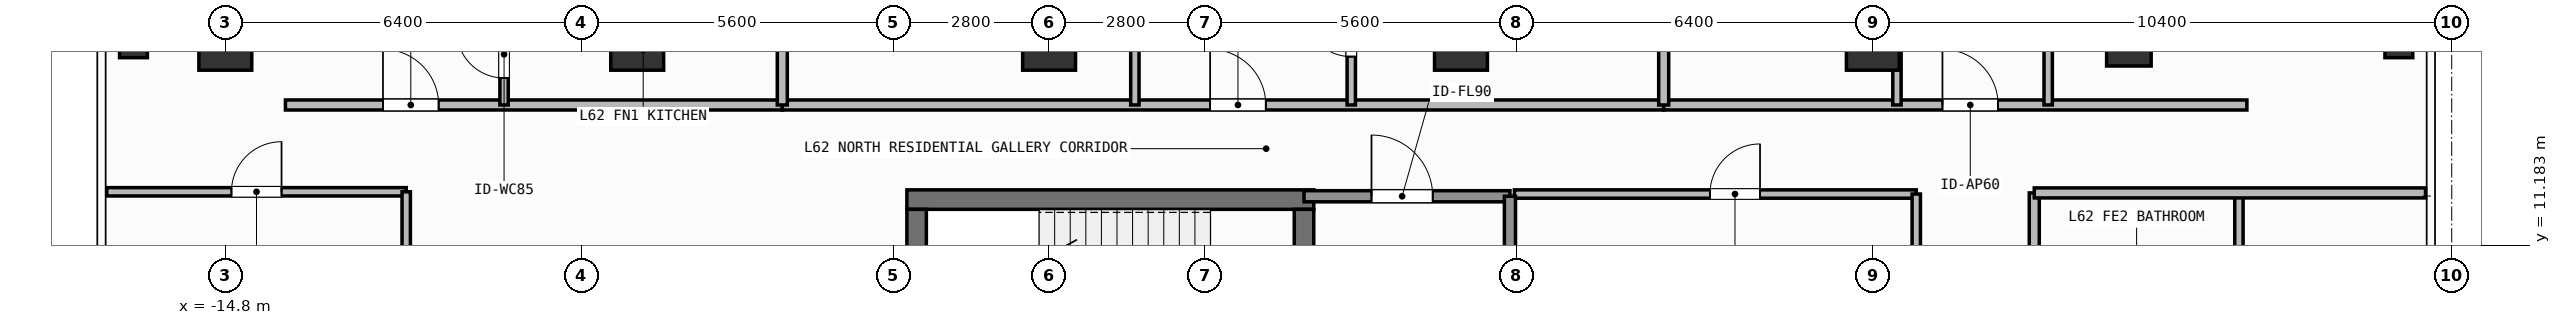
"""IFC4 building model, lengths in metres.
Left out: names, types, materials, properties, quantities, classifications, styles, units other than length and angle.
Written with IfcOpenShell. Run it as: python <this file> out.ifc"""

import sys

from ifc_helpers import new_model, si_unit, direction, frame, frame_2d, origin, origin_2d, place, context, subcontext, project, spatial, rectangle, hollow_rectangle, extrude, element, fill, save


model = new_model("IFC4")
c1 = context("Model", 3, precision=1e-05, world=origin(), true_north=direction((0.0, 1.0)))
c2 = subcontext(c1, "Body", "Model", "MODEL_VIEW")
j1 = project(units=[si_unit("LENGTHUNIT", "METRE"), si_unit("PLANEANGLEUNIT", "RADIAN")], contexts=[c1])
p1 = place(None, origin())
s1 = spatial("IfcSite", under=j1, at=p1, CompositionType="ELEMENT")
p2 = place(p1, origin())
s2 = spatial("IfcBuilding", under=s1, at=p2, CompositionType="ELEMENT")
p3 = place(p2, frame((0.0, 0.0, 254.7)))
s3 = spatial("IfcBuildingStorey", under=s2, at=p3, CompositionType="ELEMENT", Elevation=254.7)
p4 = place(p3, frame((-2.555, 12.0, 0.0), z_axis=(0.0, 0.0, 1.0), x_axis=(1.0, 0.0, 0.0)))
e1 = element("IfcWall", 1, at=p4, inside=s3, PredefinedType="SHEAR", context=c2, shape_type="SweptSolid", body=[
    extrude(rectangle(XDim=7.31, YDim=0.35, at=frame_2d((3.655, 0.0))), origin(), (0.0, 0.0, 1.0), 3.9),
])
p5 = place(p3, frame((-2.38, 8.9, 0.0), z_axis=(0.0, 0.0, 1.0), x_axis=(0.0, 1.0, 0.0)))
e2 = element("IfcWall", 2, at=p5, inside=s3, PredefinedType="SHEAR", context=c2, shape_type="SweptSolid", body=[
    extrude(rectangle(XDim=2.925, YDim=0.35, at=frame_2d((1.462, 0.0))), origin(), (0.0, 0.0, 1.0), 3.9),
])
p6 = place(p3, frame((4.58, 11.825, 0.0), z_axis=(0.0, 0.0, 1.0), x_axis=(0.0, -1.0, 0.0)))
e3 = element("IfcWall", 3, at=p6, inside=s3, PredefinedType="SHEAR", context=c2, shape_type="SweptSolid", body=[
    extrude(rectangle(XDim=2.925, YDim=0.35, at=frame_2d((1.462, 0.0))), origin(), (0.0, 0.0, 1.0), 3.9),
])
p7 = place(p6, frame((0.913, 0.0, 0.0)))
e4 = element("IfcOpeningElement", 4, at=p7, cuts=e3, PredefinedType="OPENING", context=c2, shape_type="SweptSolid", body=[
    extrude(rectangle(XDim=1.1, YDim=2.15, at=frame_2d((0.55, 1.075))), frame((0.0, 0.185, 0.0), z_axis=(0.0, -1.0, 0.0), x_axis=(1.0, 0.0, 0.0)), (0.0, 0.0, 1.0), 0.37),
])
for number, where, z_axis, x_axis in (
    (5, (-14.8, 14.8, 0.0), (0.0, 0.0, 1.0), (1.0, 0.0, 0.0)),
    (6, (-7.4, 14.8, 0.0), (0.0, 0.0, 1.0), (1.0, 0.0, 0.0)),
    (7, (0.0, 14.8, 0.0), (0.0, 0.0, 1.0), (1.0, 0.0, 0.0)),
    (8, (7.4, 14.8, 0.0), (0.0, 0.0, 1.0), (1.0, 0.0, 0.0)),
    (9, (14.8, 14.8, 0.0), (0.0, 0.0, 1.0), (1.0, 0.0, 0.0)),
):
    element("IfcColumn", number, at=place(p3, frame(where, z_axis=z_axis, x_axis=x_axis)), inside=s3, PredefinedType="COLUMN", context=c2, shape_type="SweptSolid", body=[
        extrude(rectangle(XDim=0.95, YDim=0.95, at=origin_2d()), origin(), (0.0, 0.0, 1.0), 3.9),
    ])
p8 = place(p3, frame((19.4, 14.8, 0.0), z_axis=(0.0, 0.0, 1.0), x_axis=(1.0, 0.0, 0.0)))
e10 = element("IfcColumn", 10, at=p8, inside=s3, PredefinedType="COLUMN", context=c2, shape_type="SweptSolid", body=[
    extrude(hollow_rectangle(XDim=0.8, YDim=0.8, WallThickness=0.036, at=origin_2d()), origin(), (0.0, 0.0, 1.0), 3.9),
])
for number, where, z_axis, x_axis in (
    (11, (-16.45, 14.8, 0.0), (0.0, 0.0, 1.0), (1.0, 0.0, 0.0)),
    (12, (24.25, 14.8, 0.0), (0.0, 0.0, 1.0), (1.0, 0.0, 0.0)),
):
    element("IfcColumn", number, at=place(p3, frame(where, z_axis=z_axis, x_axis=x_axis)), inside=s3, PredefinedType="COLUMN", context=c2, shape_type="SweptSolid", body=[
        extrude(hollow_rectangle(XDim=0.5, YDim=0.5, WallThickness=0.025, at=origin_2d()), origin(), (0.0, 0.0, 1.0), 3.9),
    ])
p9 = place(p3, frame((4.58, 12.06, 0.0), z_axis=(0.0, 0.0, 1.0), x_axis=(1.0, 0.0, 0.0)))
e13 = element("IfcWall", 13, at=p9, inside=s3, PredefinedType="SOLIDWALL", context=c2, shape_type="SweptSolid", body=[
    extrude(rectangle(XDim=3.7, YDim=0.2, at=frame_2d((1.85, 0.0))), origin(), (0.0, 0.0, 1.0), 3.68),
])
p10 = place(p9, frame((1.212, 0.0, 0.0)))
e14 = element("IfcOpeningElement", 14, at=p10, cuts=e13, PredefinedType="OPENING", context=c2, shape_type="SweptSolid", body=[
    extrude(rectangle(XDim=1.1, YDim=2.15, at=frame_2d((0.55, 1.075))), frame((0.0, 0.11, 0.0), z_axis=(0.0, -1.0, 0.0), x_axis=(1.0, 0.0, 0.0)), (0.0, 0.0, 1.0), 0.22),
])
p11 = place(p3, frame((8.36, 12.1, 0.0), z_axis=(0.0, 0.0, 1.0), x_axis=(1.0, 0.0, 0.0)))
e15 = element("IfcWall", 15, at=p11, inside=s3, PredefinedType="PARTITIONING", context=c2, shape_type="SweptSolid", body=[
    extrude(rectangle(XDim=7.22, YDim=0.15, at=frame_2d((3.61, 0.0))), origin(), (0.0, 0.0, 1.0), 3.68),
])
p12 = place(p11, frame((3.513, 0.0, 0.0)))
e16 = element("IfcOpeningElement", 16, at=p12, cuts=e15, PredefinedType="OPENING", context=c2, shape_type="SweptSolid", body=[
    extrude(rectangle(XDim=0.9, YDim=2.1, at=frame_2d((0.45, 1.05))), frame((0.0, 0.085, 0.0), z_axis=(0.0, -1.0, 0.0), x_axis=(1.0, 0.0, 0.0)), (0.0, 0.0, 1.0), 0.17),
])
p13 = place(p3, frame((-13.72, 13.7, 0.0), z_axis=(0.0, 0.0, 1.0), x_axis=(1.0, 0.0, 0.0)))
e17 = element("IfcWall", 17, at=p13, inside=s3, PredefinedType="PARTITIONING", context=c2, shape_type="SweptSolid", body=[
    extrude(rectangle(XDim=8.927, YDim=0.18, at=frame_2d((4.463, 0.0))), origin(), (0.0, 0.0, 1.0), 3.68),
])
p14 = place(p13, frame((1.752, 0.0, 0.0)))
e18 = element("IfcOpeningElement", 18, at=p14, cuts=e17, PredefinedType="OPENING", context=c2, shape_type="SweptSolid", body=[
    extrude(rectangle(XDim=1.0, YDim=2.2, at=frame_2d((0.5, 1.1))), frame((0.0, 0.1, 0.0), z_axis=(0.0, -1.0, 0.0), x_axis=(1.0, 0.0, 0.0)), (0.0, 0.0, 1.0), 0.2),
])
p15 = place(p3, frame((-9.792, 13.7, 0.0), z_axis=(0.0, 0.0, 1.0), x_axis=(0.0, 1.0, 0.0)))
e19 = element("IfcWall", 19, at=p15, inside=s3, PredefinedType="PARTITIONING", context=c2, shape_type="SweptSolid", body=[
    extrude(rectangle(XDim=1.982, YDim=0.15, at=frame_2d((0.991, 0.0))), origin(), (0.0, 0.0, 1.0), 3.68),
])
p16 = place(p15, frame((0.485, 0.0, 0.0)))
e20 = element("IfcOpeningElement", 20, at=p16, cuts=e19, PredefinedType="OPENING", context=c2, shape_type="SweptSolid", body=[
    extrude(rectangle(XDim=0.85, YDim=2.1, at=frame_2d((0.425, 1.05))), frame((0.0, 0.085, 0.0), z_axis=(0.0, -1.0, 0.0), x_axis=(1.0, 0.0, 0.0)), (0.0, 0.0, 1.0), 0.17),
])
p17 = place(p3, frame((-4.793, 13.7, 0.0), z_axis=(0.0, 0.0, 1.0), x_axis=(1.0, 0.0, 0.0)))
e21 = element("IfcWall", 21, at=p17, inside=s3, PredefinedType="PARTITIONING", context=c2, shape_type="SweptSolid", body=[
    extrude(rectangle(XDim=15.835, YDim=0.18, at=frame_2d((7.917, 0.0))), origin(), (0.0, 0.0, 1.0), 3.68),
])
p18 = place(p17, frame((7.686, 0.0, 0.0)))
e22 = element("IfcOpeningElement", 22, at=p18, cuts=e21, PredefinedType="OPENING", context=c2, shape_type="SweptSolid", body=[
    extrude(rectangle(XDim=1.0, YDim=2.2, at=frame_2d((0.5, 1.1))), frame((0.0, 0.1, 0.0), z_axis=(0.0, -1.0, 0.0), x_axis=(1.0, 0.0, 0.0)), (0.0, 0.0, 1.0), 0.2),
])
p19 = place(p3, frame((1.541, 13.7, 0.0), z_axis=(0.0, 0.0, 1.0), x_axis=(0.0, 1.0, 0.0)))
e23 = element("IfcWall", 23, at=p19, inside=s3, PredefinedType="PARTITIONING", context=c2, shape_type="SweptSolid", body=[
    extrude(rectangle(XDim=4.147, YDim=0.15, at=frame_2d((2.073, 0.0))), origin(), (0.0, 0.0, 1.0), 3.68),
])
p20 = place(p19, frame((1.736, 0.0, 0.0)))
e24 = element("IfcOpeningElement", 24, at=p20, cuts=e23, PredefinedType="OPENING", context=c2, shape_type="SweptSolid", body=[
    extrude(rectangle(XDim=0.85, YDim=2.1, at=frame_2d((0.425, 1.05))), frame((0.0, 0.085, 0.0), z_axis=(0.0, -1.0, 0.0), x_axis=(1.0, 0.0, 0.0)), (0.0, 0.0, 1.0), 0.17),
])
p21 = place(p3, frame((5.429, 13.7, 0.0), z_axis=(0.0, 0.0, 1.0), x_axis=(0.0, 1.0, 0.0)))
e25 = element("IfcWall", 25, at=p21, inside=s3, PredefinedType="PARTITIONING", context=c2, shape_type="SweptSolid", body=[
    extrude(rectangle(XDim=2.588, YDim=0.15, at=frame_2d((1.294, 0.0))), origin(), (0.0, 0.0, 1.0), 3.68),
])
p22 = place(p21, frame((0.869, 0.0, 0.0)))
e26 = element("IfcOpeningElement", 26, at=p22, cuts=e25, PredefinedType="OPENING", context=c2, shape_type="SweptSolid", body=[
    extrude(rectangle(XDim=0.85, YDim=2.1, at=frame_2d((0.425, 1.05))), frame((0.0, 0.085, 0.0), z_axis=(0.0, -1.0, 0.0), x_axis=(1.0, 0.0, 0.0)), (0.0, 0.0, 1.0), 0.17),
])
p23 = place(p3, frame((11.042, 13.7, 0.0), z_axis=(0.0, 0.0, 1.0), x_axis=(1.0, 0.0, 0.0)))
e27 = element("IfcWall", 27, at=p23, inside=s3, PredefinedType="PARTITIONING", context=c2, shape_type="SweptSolid", body=[
    extrude(rectangle(XDim=10.478, YDim=0.18, at=frame_2d((5.239, 0.0))), origin(), (0.0, 0.0, 1.0), 3.68),
])
p24 = place(p23, frame((5.008, 0.0, 0.0)))
e28 = element("IfcOpeningElement", 28, at=p24, cuts=e27, PredefinedType="OPENING", context=c2, shape_type="SweptSolid", body=[
    extrude(rectangle(XDim=1.0, YDim=2.2, at=frame_2d((0.5, 1.1))), frame((0.0, 0.1, 0.0), z_axis=(0.0, -1.0, 0.0), x_axis=(1.0, 0.0, 0.0)), (0.0, 0.0, 1.0), 0.2),
])
p25 = place(p3, frame((15.233, 13.7, 0.0), z_axis=(0.0, 0.0, 1.0), x_axis=(0.0, 1.0, 0.0)))
e29 = element("IfcWall", 29, at=p25, inside=s3, PredefinedType="PARTITIONING", context=c2, shape_type="SweptSolid", body=[
    extrude(rectangle(XDim=4.25, YDim=0.15, at=frame_2d((2.125, 0.0))), origin(), (0.0, 0.0, 1.0), 3.68),
])
p26 = place(p25, frame((1.7, 0.0, 0.0)))
e30 = element("IfcOpeningElement", 30, at=p26, cuts=e29, PredefinedType="OPENING", context=c2, shape_type="SweptSolid", body=[
    extrude(rectangle(XDim=0.85, YDim=2.1, at=frame_2d((0.425, 1.05))), frame((0.0, 0.085, 0.0), z_axis=(0.0, -1.0, 0.0), x_axis=(1.0, 0.0, 0.0)), (0.0, 0.0, 1.0), 0.17),
])
p27 = place(p3, frame((17.95, 13.7, 0.0), z_axis=(0.0, 0.0, 1.0), x_axis=(0.0, 1.0, 0.0)))
e31 = element("IfcWall", 31, at=p27, inside=s3, PredefinedType="PARTITIONING", context=c2, shape_type="SweptSolid", body=[
    extrude(rectangle(XDim=4.25, YDim=0.15, at=frame_2d((2.125, 0.0))), origin(), (0.0, 0.0, 1.0), 3.68),
])
p28 = place(p27, frame((1.7, 0.0, 0.0)))
e32 = element("IfcOpeningElement", 32, at=p28, cuts=e31, PredefinedType="OPENING", context=c2, shape_type="SweptSolid", body=[
    extrude(rectangle(XDim=0.85, YDim=2.1, at=frame_2d((0.425, 1.05))), frame((0.0, 0.085, 0.0), z_axis=(0.0, -1.0, 0.0), x_axis=(1.0, 0.0, 0.0)), (0.0, 0.0, 1.0), 0.17),
])
p29 = place(p3, frame((-16.93, 12.14, 0.0), z_axis=(0.0, 0.0, 1.0), x_axis=(1.0, 0.0, 0.0)))
e33 = element("IfcWall", 33, at=p29, inside=s3, PredefinedType="PARTITIONING", context=c2, shape_type="SweptSolid", body=[
    extrude(rectangle(XDim=5.38, YDim=0.15, at=frame_2d((2.69, 0.0))), origin(), (0.0, 0.0, 1.0), 3.68),
])
p30 = place(p29, frame((2.24, 0.0, 0.0)))
e34 = element("IfcOpeningElement", 34, at=p30, cuts=e33, PredefinedType="OPENING", context=c2, shape_type="SweptSolid", body=[
    extrude(rectangle(XDim=0.9, YDim=2.1, at=frame_2d((0.45, 1.05))), frame((0.0, 0.085, 0.0), z_axis=(0.0, -1.0, 0.0), x_axis=(1.0, 0.0, 0.0)), (0.0, 0.0, 1.0), 0.17),
])
p31 = place(p3, frame((17.7, 1.454, 0.0), z_axis=(0.0, 0.0, 1.0), x_axis=(0.0, 1.0, 0.0)))
e35 = element("IfcWall", 35, at=p31, inside=s3, PredefinedType="PARTITIONING", context=c2, shape_type="SweptSolid", body=[
    extrude(rectangle(XDim=10.666, YDim=0.18, at=frame_2d((5.333, 0.0))), origin(), (0.0, 0.0, 1.0), 3.68),
])
p32 = place(p31, frame((4.473, 0.0, 0.0)))
e36 = element("IfcOpeningElement", 36, at=p32, cuts=e35, PredefinedType="OPENING", context=c2, shape_type="SweptSolid", body=[
    extrude(rectangle(XDim=1.0, YDim=2.2, at=frame_2d((0.5, 1.1))), frame((0.0, 0.1, 0.0), z_axis=(0.0, -1.0, 0.0), x_axis=(1.0, 0.0, 0.0)), (0.0, 0.0, 1.0), 0.2),
])
p33 = place(p3, frame((8.28, 8.725, 0.0), z_axis=(0.0, 0.0, 1.0), x_axis=(0.0, 1.0, 0.0)))
e37 = element("IfcWall", 37, at=p33, inside=s3, PredefinedType="SOLIDWALL", context=c2, shape_type="SweptSolid", body=[
    extrude(rectangle(XDim=3.335, YDim=0.2, at=frame_2d((1.667, 0.0))), origin(), (0.0, 0.0, 1.0), 3.68),
])
p34 = place(p3, frame((15.58, 5.85, 0.0), z_axis=(0.0, 0.0, 1.0), x_axis=(0.0, 1.0, 0.0)))
e38 = element("IfcWall", 38, at=p34, inside=s3, PredefinedType="PARTITIONING", context=c2, shape_type="SweptSolid", body=[
    extrude(rectangle(XDim=6.25, YDim=0.15, at=frame_2d((3.125, 0.0))), origin(), (0.0, 0.0, 1.0), 3.68),
])
p35 = place(p3, frame((-4.793, 13.7, 0.0), z_axis=(0.0, 0.0, 1.0), x_axis=(0.0, 1.0, 0.0)))
e39 = element("IfcWall", 39, at=p35, inside=s3, PredefinedType="PARTITIONING", context=c2, shape_type="SweptSolid", body=[
    extrude(rectangle(XDim=7.33, YDim=0.18, at=frame_2d((3.665, 0.0))), origin(), (0.0, 0.0, 1.0), 3.68),
])
p36 = place(p3, frame((11.042, 13.7, 0.0), z_axis=(0.0, 0.0, 1.0), x_axis=(0.0, 1.0, 0.0)))
e40 = element("IfcWall", 40, at=p36, inside=s3, PredefinedType="PARTITIONING", context=c2, shape_type="SweptSolid", body=[
    extrude(rectangle(XDim=7.33, YDim=0.18, at=frame_2d((3.665, 0.0))), origin(), (0.0, 0.0, 1.0), 3.42),
])
p37 = place(p3, frame((-11.55, 1.8, 0.0), z_axis=(0.0, 0.0, 1.0), x_axis=(0.0, 1.0, 0.0)))
e41 = element("IfcWall", 41, at=p37, inside=s3, PredefinedType="PARTITIONING", context=c2, shape_type="SweptSolid", body=[
    extrude(rectangle(XDim=10.34, YDim=0.15, at=frame_2d((5.17, 0.0))), origin(), (0.0, 0.0, 1.0), 3.68),
])
p38 = place(p3, frame((21.377, 8.828, 0.0), z_axis=(0.0, 0.0, 1.0), x_axis=(0.0, 1.0, 0.0)))
e42 = element("IfcWall", 42, at=p38, inside=s3, PredefinedType="PARTITIONING", context=c2, shape_type="SweptSolid", body=[
    extrude(rectangle(XDim=3.292, YDim=0.15, at=frame_2d((1.646, 0.0))), origin(), (0.0, 0.0, 1.0), 3.68),
])
p39 = place(p3, frame((17.7, 12.12, 0.0), z_axis=(0.0, 0.0, 1.0), x_axis=(1.0, 0.0, 0.0)))
e43 = element("IfcWall", 43, at=p39, inside=s3, PredefinedType="PARTITIONING", context=c2, shape_type="SweptSolid", body=[
    extrude(rectangle(XDim=7.03, YDim=0.18, at=frame_2d((3.515, 0.0))), origin(), (0.0, 0.0, 1.0), 3.68),
])
p40 = place(p10, origin())
e44 = element("IfcDoor", 44, at=p40, inside=s3, OperationType="SINGLE_SWING_LEFT", PredefinedType="DOOR", context=c2, shape_type="SweptSolid", body=[
    extrude(rectangle(XDim=1.1, YDim=2.15, at=frame_2d((0.55, 1.075))), frame((0.0, 0.025, 0.0), z_axis=(0.0, -1.0, 0.0), x_axis=(1.0, 0.0, 0.0)), (0.0, 0.0, 1.0), 0.05),
])
fill(e14, e44)
p41 = place(p12, origin())
e45 = element("IfcDoor", 45, at=p41, inside=s3, OperationType="SINGLE_SWING_RIGHT", PredefinedType="DOOR", context=c2, shape_type="SweptSolid", body=[
    extrude(rectangle(XDim=0.9, YDim=2.1, at=frame_2d((0.45, 1.05))), frame((0.0, 0.025, 0.0), z_axis=(0.0, -1.0, 0.0), x_axis=(1.0, 0.0, 0.0)), (0.0, 0.0, 1.0), 0.05),
])
fill(e16, e45)
p42 = place(p14, origin())
e46 = element("IfcDoor", 46, at=p42, inside=s3, OperationType="SINGLE_SWING_LEFT", PredefinedType="DOOR", context=c2, shape_type="SweptSolid", body=[
    extrude(rectangle(XDim=1.0, YDim=2.2, at=frame_2d((0.5, 1.1))), frame((0.0, 0.025, 0.0), z_axis=(0.0, -1.0, 0.0), x_axis=(1.0, 0.0, 0.0)), (0.0, 0.0, 1.0), 0.05),
])
fill(e18, e46)
p43 = place(p16, origin())
e47 = element("IfcDoor", 47, at=p43, inside=s3, OperationType="SINGLE_SWING_RIGHT", PredefinedType="DOOR", context=c2, shape_type="SweptSolid", body=[
    extrude(rectangle(XDim=0.85, YDim=2.1, at=frame_2d((0.425, 1.05))), frame((0.0, 0.025, 0.0), z_axis=(0.0, -1.0, 0.0), x_axis=(1.0, 0.0, 0.0)), (0.0, 0.0, 1.0), 0.05),
])
fill(e20, e47)
p44 = place(p18, origin())
e48 = element("IfcDoor", 48, at=p44, inside=s3, OperationType="SINGLE_SWING_LEFT", PredefinedType="DOOR", context=c2, shape_type="SweptSolid", body=[
    extrude(rectangle(XDim=1.0, YDim=2.2, at=frame_2d((0.5, 1.1))), frame((0.0, 0.025, 0.0), z_axis=(0.0, -1.0, 0.0), x_axis=(1.0, 0.0, 0.0)), (0.0, 0.0, 1.0), 0.05),
])
fill(e22, e48)
p45 = place(p22, origin())
e49 = element("IfcDoor", 49, at=p45, inside=s3, OperationType="SINGLE_SWING_RIGHT", PredefinedType="DOOR", context=c2, shape_type="SweptSolid", body=[
    extrude(rectangle(XDim=0.85, YDim=2.1, at=frame_2d((0.425, 1.05))), frame((0.0, 0.025, 0.0), z_axis=(0.0, -1.0, 0.0), x_axis=(1.0, 0.0, 0.0)), (0.0, 0.0, 1.0), 0.05),
])
fill(e26, e49)
p46 = place(p24, origin())
e50 = element("IfcDoor", 50, at=p46, inside=s3, OperationType="SINGLE_SWING_LEFT", PredefinedType="DOOR", context=c2, shape_type="SweptSolid", body=[
    extrude(rectangle(XDim=1.0, YDim=2.2, at=frame_2d((0.5, 1.1))), frame((0.0, 0.025, 0.0), z_axis=(0.0, -1.0, 0.0), x_axis=(1.0, 0.0, 0.0)), (0.0, 0.0, 1.0), 0.05),
])
fill(e28, e50)
p47 = place(p30, origin())
e51 = element("IfcDoor", 51, at=p47, inside=s3, OperationType="SINGLE_SWING_RIGHT", PredefinedType="DOOR", context=c2, shape_type="SweptSolid", body=[
    extrude(rectangle(XDim=0.9, YDim=2.1, at=frame_2d((0.45, 1.05))), frame((0.0, 0.025, 0.0), z_axis=(0.0, -1.0, 0.0), x_axis=(1.0, 0.0, 0.0)), (0.0, 0.0, 1.0), 0.05),
])
fill(e34, e51)
save(model, sys.argv[1])
